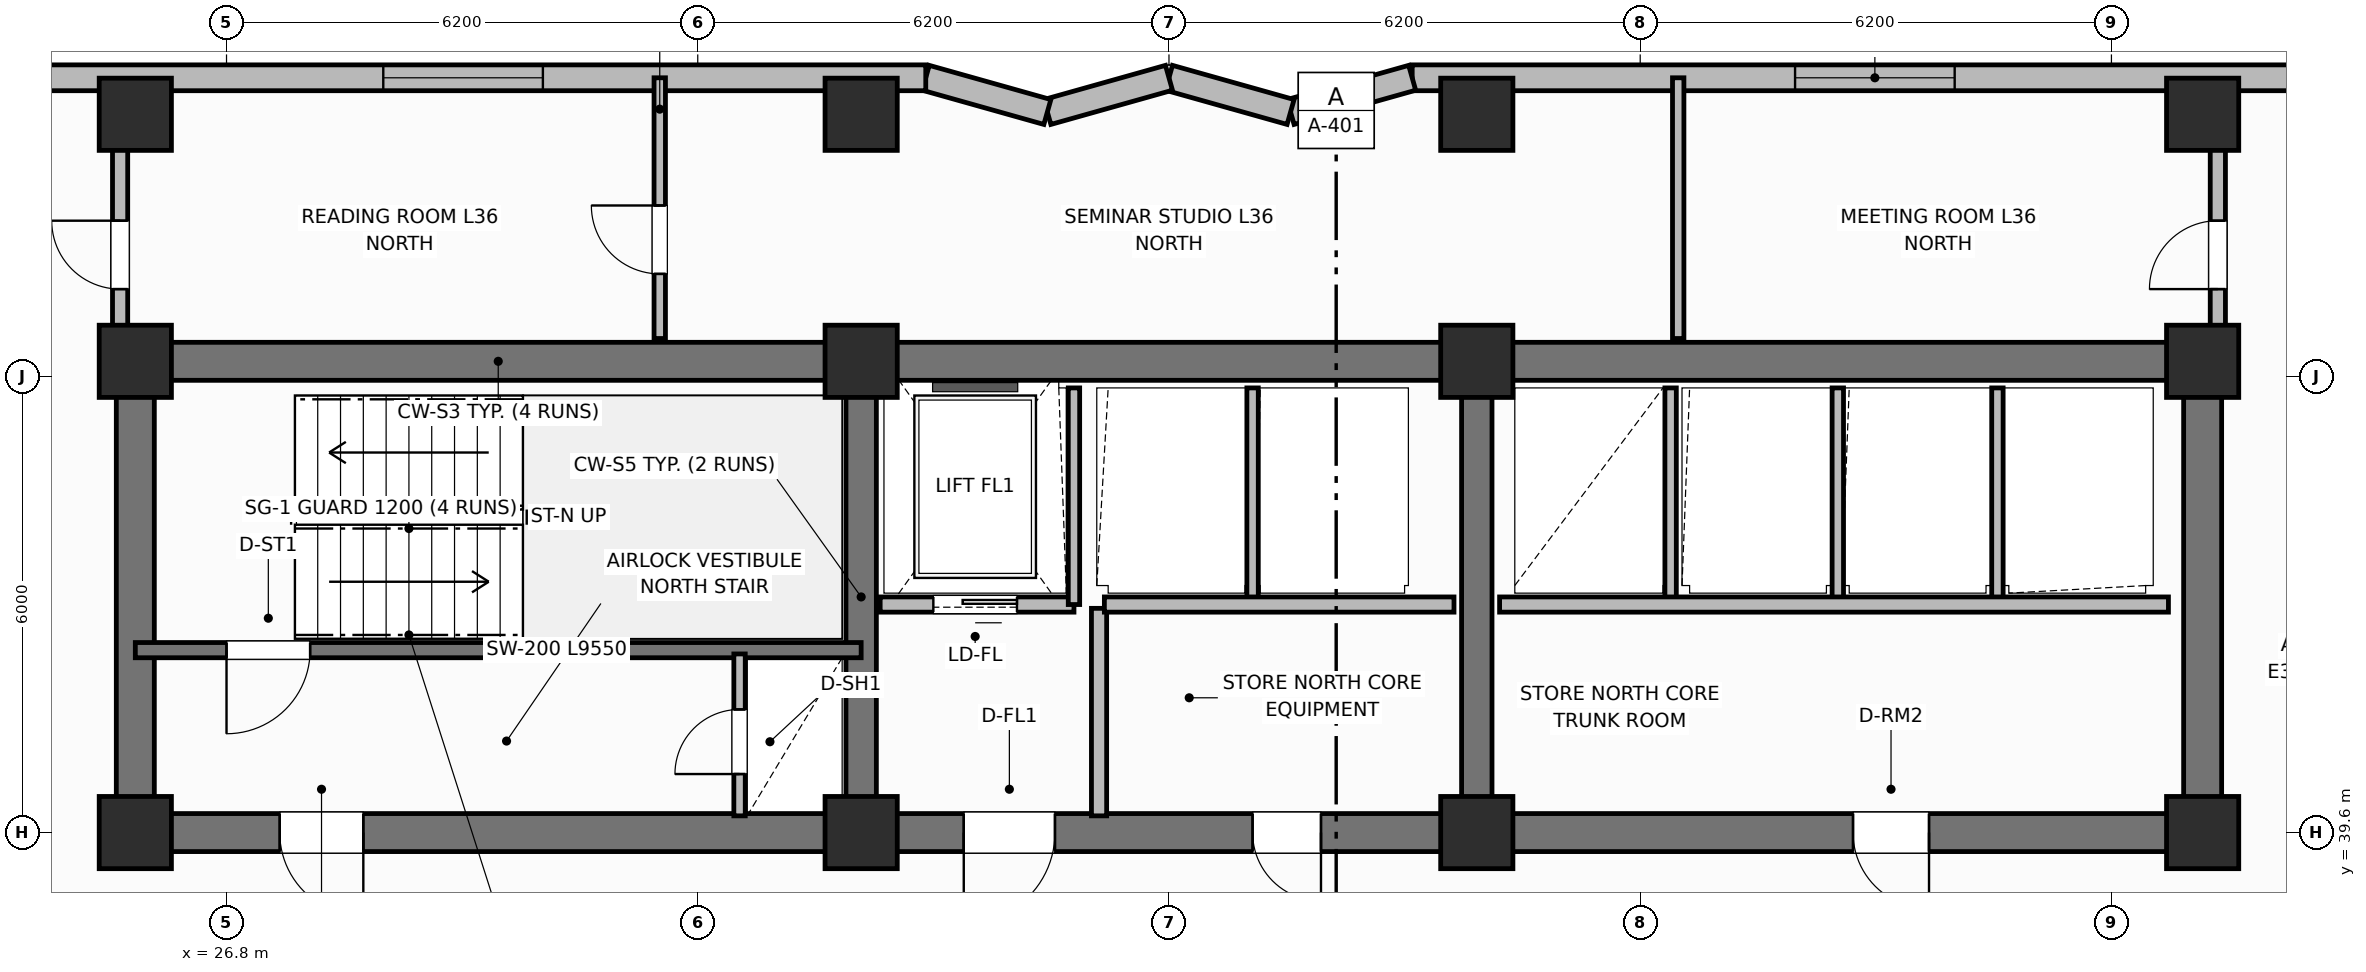
"""IFC4 building model, lengths in metres.
Left out: names, types, materials, properties, quantities, classifications, styles, units other than length and angle.
Written with IfcOpenShell. Run it as: python <this file> out.ifc"""

import sys

from ifc_helpers import new_model, si_unit, direction, frame, frame_2d, origin, origin_2d, place, context, subcontext, project, spatial, rectangle, extrude, element, fill, save


model = new_model("IFC4")
c1 = context("Model", 3, precision=1e-05, world=origin(), true_north=direction((0.0, 1.0)))
c2 = subcontext(c1, "Body", "Model", "MODEL_VIEW")
j1 = project(units=[si_unit("LENGTHUNIT", "METRE"), si_unit("PLANEANGLEUNIT", "RADIAN")], contexts=[c1])
p1 = place(None, origin())
s1 = spatial("IfcSite", under=j1, at=p1, CompositionType="ELEMENT")
p2 = place(p1, origin())
s2 = spatial("IfcBuilding", under=s1, at=p2, CompositionType="ELEMENT")
p3 = place(p2, frame((0.0, 0.0, 147.8)))
s3 = spatial("IfcBuildingStorey", under=s2, at=p3, CompositionType="ELEMENT", Elevation=147.8)
p4 = place(p3, frame((25.6, 45.8, 0.0), z_axis=(0.0, 0.0, 1.0), x_axis=(1.0, 0.0, 0.0)))
e1 = element("IfcWall", 1, at=p4, inside=s3, PredefinedType="SHEAR", context=c2, shape_type="SweptSolid", body=[
    extrude(rectangle(XDim=27.2, YDim=0.5, at=frame_2d((13.6, 0.0))), origin(), (0.0, 0.0, 1.0), 3.7),
])
for number, where, z_axis, x_axis in (
    (2, (25.6, 39.85, 0.0), (0.0, 0.0, 1.0), (0.0, 1.0, 0.0)),
    (3, (52.8, 39.85, 0.0), (0.0, 0.0, 1.0), (0.0, 1.0, 0.0)),
):
    element("IfcWall", number, at=place(p3, frame(where, z_axis=z_axis, x_axis=x_axis)), inside=s3, PredefinedType="SHEAR", context=c2, shape_type="SweptSolid", body=[
        extrude(rectangle(XDim=5.7, YDim=0.5, at=frame_2d((2.85, 0.0))), origin(), (0.0, 0.0, 1.0), 3.7),
    ])
p5 = place(p3, frame((52.8, 39.6, 0.0), z_axis=(0.0, 0.0, 1.0), x_axis=(-1.0, 0.0, 0.0)))
e4 = element("IfcWall", 4, at=p5, inside=s3, PredefinedType="SHEAR", context=c2, shape_type="SweptSolid", body=[
    extrude(rectangle(XDim=27.2, YDim=0.5, at=frame_2d((13.6, 0.0))), origin(), (0.0, 0.0, 1.0), 3.7),
])
p6 = place(p5, frame((24.2, 0.0, 0.0)))
e5 = element("IfcOpeningElement", 5, at=p6, cuts=e4, PredefinedType="OPENING", context=c2, shape_type="SweptSolid", body=[
    extrude(rectangle(XDim=1.1, YDim=2.15, at=frame_2d((0.55, 1.075))), frame((0.0, 0.26, 0.0), z_axis=(0.0, -1.0, 0.0), x_axis=(1.0, 0.0, 0.0)), (0.0, 0.0, 1.0), 0.52),
])
p7 = place(p5, frame((15.1, 0.0, 0.0)))
e6 = element("IfcOpeningElement", 6, at=p7, cuts=e4, PredefinedType="OPENING", context=c2, shape_type="SweptSolid", body=[
    extrude(rectangle(XDim=1.2, YDim=2.15, at=frame_2d((0.6, 1.075))), frame((0.0, 0.26, 0.0), z_axis=(0.0, -1.0, 0.0), x_axis=(1.0, 0.0, 0.0)), (0.0, 0.0, 1.0), 0.52),
])
p8 = place(p5, frame((11.6, 0.0, 0.0)))
e7 = element("IfcOpeningElement", 7, at=p8, cuts=e4, PredefinedType="OPENING", context=c2, shape_type="SweptSolid", body=[
    extrude(rectangle(XDim=0.9, YDim=2.1, at=frame_2d((0.45, 1.05))), frame((0.0, 0.26, 0.0), z_axis=(0.0, -1.0, 0.0), x_axis=(1.0, 0.0, 0.0)), (0.0, 0.0, 1.0), 0.52),
])
p9 = place(p5, frame((3.6, 0.0, 0.0)))
e8 = element("IfcOpeningElement", 8, at=p9, cuts=e4, PredefinedType="OPENING", context=c2, shape_type="SweptSolid", body=[
    extrude(rectangle(XDim=1.0, YDim=2.15, at=frame_2d((0.5, 1.075))), frame((0.0, 0.26, 0.0), z_axis=(0.0, -1.0, 0.0), x_axis=(1.0, 0.0, 0.0)), (0.0, 0.0, 1.0), 0.52),
])
for number, where, z_axis, x_axis in (
    (9, (35.15, 39.85, 0.0), (0.0, 0.0, 1.0), (0.0, 1.0, 0.0)),
    (10, (43.25, 39.85, 0.0), (0.0, 0.0, 1.0), (0.0, 1.0, 0.0)),
):
    element("IfcWall", number, at=place(p3, frame(where, z_axis=z_axis, x_axis=x_axis)), inside=s3, PredefinedType="SHEAR", context=c2, shape_type="SweptSolid", body=[
        extrude(rectangle(XDim=5.7, YDim=0.4, at=frame_2d((2.85, 0.0))), origin(), (0.0, 0.0, 1.0), 3.7),
    ])
for number, where, z_axis, x_axis in (
    (11, (25.6, 39.6, 0.0), (0.0, 0.0, 1.0), (1.0, 0.0, 0.0)),
    (12, (25.6, 45.8, 0.0), (0.0, 0.0, 1.0), (1.0, 0.0, 0.0)),
    (13, (35.15, 39.6, 0.0), (0.0, 0.0, 1.0), (1.0, 0.0, 0.0)),
    (14, (35.15, 45.8, 0.0), (0.0, 0.0, 1.0), (1.0, 0.0, 0.0)),
    (15, (43.25, 39.6, 0.0), (0.0, 0.0, 1.0), (1.0, 0.0, 0.0)),
    (16, (43.25, 45.8, 0.0), (0.0, 0.0, 1.0), (1.0, 0.0, 0.0)),
    (17, (52.8, 39.6, 0.0), (0.0, 0.0, 1.0), (1.0, 0.0, 0.0)),
    (18, (52.8, 45.8, 0.0), (0.0, 0.0, 1.0), (1.0, 0.0, 0.0)),
    (19, (25.6, 49.05, 0.0), (0.0, 0.0, 1.0), (1.0, 0.0, 0.0)),
    (20, (35.15, 49.05, 0.0), (0.0, 0.0, 1.0), (1.0, 0.0, 0.0)),
    (21, (43.25, 49.05, 0.0), (0.0, 0.0, 1.0), (1.0, 0.0, 0.0)),
    (22, (52.8, 49.05, 0.0), (0.0, 0.0, 1.0), (1.0, 0.0, 0.0)),
):
    element("IfcColumn", number, at=place(p3, frame(where, z_axis=z_axis, x_axis=x_axis)), inside=s3, PredefinedType="COLUMN", context=c2, shape_type="SweptSolid", body=[
        extrude(rectangle(XDim=0.95, YDim=0.95, at=origin_2d()), origin(), (0.0, 0.0, 1.0), 3.7),
    ])
p10 = place(p3, frame((58.2, 49.53, 0.0), z_axis=(0.0, 0.0, 1.0), x_axis=(-1.0, 0.0, 0.0)))
e23 = element("IfcWall", 23, at=p10, inside=s3, PredefinedType="SOLIDWALL", context=c2, shape_type="SweptSolid", body=[
    extrude(rectangle(XDim=15.8, YDim=0.34, at=frame_2d((7.9, 0.0))), origin(), (0.0, 0.0, 1.0), 2.72),
])
p11 = place(p10, frame((8.663, 0.0, 0.7)))
e24 = element("IfcOpeningElement", 24, at=p11, cuts=e23, PredefinedType="OPENING", context=c2, shape_type="SweptSolid", body=[
    extrude(rectangle(XDim=2.1, YDim=1.9, at=frame_2d((1.05, 0.95))), frame((0.0, 0.18, 0.0), z_axis=(0.0, -1.0, 0.0), x_axis=(1.0, 0.0, 0.0)), (0.0, 0.0, 1.0), 0.36),
])
p12 = place(p3, frame((42.4, 49.53, 0.0), z_axis=(0.0, 0.0, 1.0), x_axis=(-0.962652136636, -0.270741322725, 0.0)))
e25 = element("IfcWall", 25, at=p12, inside=s3, PredefinedType="SOLIDWALL", context=c2, shape_type="SweptSolid", body=[
    extrude(rectangle(XDim=1.662, YDim=0.34, at=frame_2d((0.831, 0.0))), origin(), (0.0, 0.0, 1.0), 2.72),
])
p13 = place(p3, frame((40.8, 49.08, 0.0), z_axis=(0.0, 0.0, 1.0), x_axis=(-0.962662902433, 0.270703040766, 0.0)))
e26 = element("IfcWall", 26, at=p13, inside=s3, PredefinedType="SOLIDWALL", context=c2, shape_type="SweptSolid", body=[
    extrude(rectangle(XDim=1.662, YDim=0.34, at=frame_2d((0.831, 0.0))), origin(), (0.0, 0.0, 1.0), 2.72),
])
p14 = place(p3, frame((39.2, 49.53, 0.0), z_axis=(0.0, 0.0, 1.0), x_axis=(-0.962652136636, -0.270741322725, 0.0)))
e27 = element("IfcWall", 27, at=p14, inside=s3, PredefinedType="SOLIDWALL", context=c2, shape_type="SweptSolid", body=[
    extrude(rectangle(XDim=1.662, YDim=0.34, at=frame_2d((0.831, 0.0))), origin(), (0.0, 0.0, 1.0), 2.72),
])
p15 = place(p3, frame((37.6, 49.08, 0.0), z_axis=(0.0, 0.0, 1.0), x_axis=(-0.962662902433, 0.270703040766, 0.0)))
e28 = element("IfcWall", 28, at=p15, inside=s3, PredefinedType="SOLIDWALL", context=c2, shape_type="SweptSolid", body=[
    extrude(rectangle(XDim=1.662, YDim=0.34, at=frame_2d((0.831, 0.0))), origin(), (0.0, 0.0, 1.0), 2.72),
])
p16 = place(p3, frame((36.0, 49.53, 0.0), z_axis=(0.0, 0.0, 1.0), x_axis=(-1.0, 0.0, 0.0)))
e29 = element("IfcWall", 29, at=p16, inside=s3, PredefinedType="SOLIDWALL", context=c2, shape_type="SweptSolid", body=[
    extrude(rectangle(XDim=15.8, YDim=0.34, at=frame_2d((7.9, 0.0))), origin(), (0.0, 0.0, 1.0), 2.72),
])
p17 = place(p16, frame((5.038, 0.0, 0.7)))
e30 = element("IfcOpeningElement", 30, at=p17, cuts=e29, PredefinedType="OPENING", context=c2, shape_type="SweptSolid", body=[
    extrude(rectangle(XDim=2.1, YDim=1.9, at=frame_2d((1.05, 0.95))), frame((0.0, 0.18, 0.0), z_axis=(0.0, -1.0, 0.0), x_axis=(1.0, 0.0, 0.0)), (0.0, 0.0, 1.0), 0.36),
])
p18 = place(p3, frame((35.15, 42.0, 0.0), z_axis=(0.0, 0.0, 1.0), x_axis=(-1.0, 0.0, 0.0)))
e31 = element("IfcWall", 31, at=p18, inside=s3, PredefinedType="SHEAR", context=c2, shape_type="SweptSolid", body=[
    extrude(rectangle(XDim=9.55, YDim=0.2, at=frame_2d((4.775, 0.0))), origin(), (0.0, 0.0, 1.0), 3.7),
])
p19 = place(p18, frame((7.25, 0.0, 0.0)))
e32 = element("IfcOpeningElement", 32, at=p19, cuts=e31, PredefinedType="OPENING", context=c2, shape_type="SweptSolid", body=[
    extrude(rectangle(XDim=1.1, YDim=2.15, at=frame_2d((0.55, 1.075))), frame((0.0, 0.11, 0.0), z_axis=(0.0, -1.0, 0.0), x_axis=(1.0, 0.0, 0.0)), (0.0, 0.0, 1.0), 0.22),
])
p20 = place(p3, frame((33.55, 39.82, 0.0), z_axis=(0.0, 0.0, 1.0), x_axis=(0.0, 1.0, 0.0)))
e33 = element("IfcWall", 33, at=p20, inside=s3, PredefinedType="PARTITIONING", context=c2, shape_type="SweptSolid", body=[
    extrude(rectangle(XDim=2.13, YDim=0.15, at=frame_2d((1.065, 0.0))), origin(), (0.0, 0.0, 1.0), 2.55),
])
p21 = place(p20, frame((0.55, 0.0, 0.0)))
e34 = element("IfcOpeningElement", 34, at=p21, cuts=e33, PredefinedType="OPENING", context=c2, shape_type="SweptSolid", body=[
    extrude(rectangle(XDim=0.85, YDim=2.05, at=frame_2d((0.425, 1.025))), frame((0.0, 0.085, 0.0), z_axis=(0.0, -1.0, 0.0), x_axis=(1.0, 0.0, 0.0)), (0.0, 0.0, 1.0), 0.17),
])
p22 = place(p3, frame((37.95, 42.6, 0.0), z_axis=(0.0, 0.0, 1.0), x_axis=(-1.0, 0.0, 0.0)))
e35 = element("IfcWall", 35, at=p22, inside=s3, PredefinedType="PARTITIONING", context=c2, shape_type="SweptSolid", body=[
    extrude(rectangle(XDim=2.55, YDim=0.2, at=frame_2d((1.275, 0.0))), origin(), (0.0, 0.0, 1.0), 2.32),
])
p23 = place(p22, frame((0.75, 0.0, 0.0)))
e36 = element("IfcOpeningElement", 36, at=p23, cuts=e35, PredefinedType="OPENING", context=c2, shape_type="SweptSolid", body=[
    extrude(rectangle(XDim=1.1, YDim=2.15, at=frame_2d((0.55, 1.075))), frame((0.0, 0.11, 0.0), z_axis=(0.0, -1.0, 0.0), x_axis=(1.0, 0.0, 0.0)), (0.0, 0.0, 1.0), 0.22),
])
p24 = place(p3, frame((37.95, 42.6, 0.0), z_axis=(0.0, 0.0, 1.0), x_axis=(0.0, 1.0, 0.0)))
e37 = element("IfcWall", 37, at=p24, inside=s3, PredefinedType="PARTITIONING", context=c2, shape_type="SweptSolid", body=[
    extrude(rectangle(XDim=2.85, YDim=0.15, at=frame_2d((1.425, 0.0))), origin(), (0.0, 0.0, 1.0), 2.55),
])
p25 = place(p3, frame((38.28, 39.82, 0.0), z_axis=(0.0, 0.0, 1.0), x_axis=(0.0, 1.0, 0.0)))
e38 = element("IfcWall", 38, at=p25, inside=s3, PredefinedType="PARTITIONING", context=c2, shape_type="SweptSolid", body=[
    extrude(rectangle(XDim=2.73, YDim=0.2, at=frame_2d((1.365, 0.0))), origin(), (0.0, 0.0, 1.0), 2.55),
])
p26 = place(p3, frame((40.3, 42.65, 0.0), z_axis=(0.0, 0.0, 1.0), x_axis=(0.0, 1.0, 0.0)))
e39 = element("IfcWall", 39, at=p26, inside=s3, PredefinedType="PARTITIONING", context=c2, shape_type="SweptSolid", body=[
    extrude(rectangle(XDim=2.8, YDim=0.15, at=frame_2d((1.4, 0.0))), origin(), (0.0, 0.0, 1.0), 2.55),
])
p27 = place(p3, frame((42.95, 42.6, 0.0), z_axis=(0.0, 0.0, 1.0), x_axis=(-1.0, 0.0, 0.0)))
e40 = element("IfcWall", 40, at=p27, inside=s3, PredefinedType="PARTITIONING", context=c2, shape_type="SweptSolid", body=[
    extrude(rectangle(XDim=4.6, YDim=0.2, at=frame_2d((2.3, 0.0))), origin(), (0.0, 0.0, 1.0), 2.32),
])
for number, where, z_axis, x_axis in (
    (41, (45.8, 42.65, 0.0), (0.0, 0.0, 1.0), (0.0, 1.0, 0.0)),
    (42, (48.0, 42.65, 0.0), (0.0, 0.0, 1.0), (0.0, 1.0, 0.0)),
    (43, (50.1, 42.65, 0.0), (0.0, 0.0, 1.0), (0.0, 1.0, 0.0)),
):
    element("IfcWall", number, at=place(p3, frame(where, z_axis=z_axis, x_axis=x_axis)), inside=s3, PredefinedType="PARTITIONING", context=c2, shape_type="SweptSolid", body=[
        extrude(rectangle(XDim=2.8, YDim=0.15, at=frame_2d((1.4, 0.0))), origin(), (0.0, 0.0, 1.0), 2.55),
    ])
p28 = place(p3, frame((52.35, 42.6, 0.0), z_axis=(0.0, 0.0, 1.0), x_axis=(-1.0, 0.0, 0.0)))
e44 = element("IfcWall", 44, at=p28, inside=s3, PredefinedType="PARTITIONING", context=c2, shape_type="SweptSolid", body=[
    extrude(rectangle(XDim=8.8, YDim=0.2, at=frame_2d((4.4, 0.0))), origin(), (0.0, 0.0, 1.0), 2.55),
])
p29 = place(p3, frame((32.5, 46.1, 0.0), z_axis=(0.0, 0.0, 1.0), x_axis=(0.0, 1.0, 0.0)))
e45 = element("IfcWall", 45, at=p29, inside=s3, PredefinedType="PARTITIONING", context=c2, shape_type="SweptSolid", body=[
    extrude(rectangle(XDim=3.43, YDim=0.15, at=frame_2d((1.715, 0.0))), origin(), (0.0, 0.0, 1.0), 2.55),
])
p30 = place(p29, frame((0.85, 0.0, 0.0)))
e46 = element("IfcOpeningElement", 46, at=p30, cuts=e45, PredefinedType="OPENING", context=c2, shape_type="SweptSolid", body=[
    extrude(rectangle(XDim=0.9, YDim=2.1, at=frame_2d((0.45, 1.05))), frame((0.0, 0.085, 0.0), z_axis=(0.0, -1.0, 0.0), x_axis=(1.0, 0.0, 0.0)), (0.0, 0.0, 1.0), 0.17),
])
p31 = place(p3, frame((45.9, 46.1, 0.0), z_axis=(0.0, 0.0, 1.0), x_axis=(0.0, 1.0, 0.0)))
e47 = element("IfcWall", 47, at=p31, inside=s3, PredefinedType="PARTITIONING", context=c2, shape_type="SweptSolid", body=[
    extrude(rectangle(XDim=3.43, YDim=0.15, at=frame_2d((1.715, 0.0))), origin(), (0.0, 0.0, 1.0), 2.55),
])
p32 = place(p3, frame((25.4, 46.1, 0.0), z_axis=(0.0, 0.0, 1.0), x_axis=(0.0, 1.0, 0.0)))
e48 = element("IfcWall", 48, at=p32, inside=s3, PredefinedType="PARTITIONING", context=c2, shape_type="SweptSolid", body=[
    extrude(rectangle(XDim=2.83, YDim=0.2, at=frame_2d((1.415, 0.0))), origin(), (0.0, 0.0, 1.0), 2.55),
])
p33 = place(p32, frame((0.65, 0.0, 0.0)))
e49 = element("IfcOpeningElement", 49, at=p33, cuts=e48, PredefinedType="OPENING", context=c2, shape_type="SweptSolid", body=[
    extrude(rectangle(XDim=0.9, YDim=2.1, at=frame_2d((0.45, 1.05))), frame((0.0, 0.11, 0.0), z_axis=(0.0, -1.0, 0.0), x_axis=(1.0, 0.0, 0.0)), (0.0, 0.0, 1.0), 0.22),
])
p34 = place(p3, frame((53.0, 46.1, 0.0), z_axis=(0.0, 0.0, 1.0), x_axis=(0.0, 1.0, 0.0)))
e50 = element("IfcWall", 50, at=p34, inside=s3, PredefinedType="PARTITIONING", context=c2, shape_type="SweptSolid", body=[
    extrude(rectangle(XDim=2.83, YDim=0.2, at=frame_2d((1.415, 0.0))), origin(), (0.0, 0.0, 1.0), 2.55),
])
p35 = place(p34, frame((0.65, 0.0, 0.0)))
e51 = element("IfcOpeningElement", 51, at=p35, cuts=e50, PredefinedType="OPENING", context=c2, shape_type="SweptSolid", body=[
    extrude(rectangle(XDim=0.9, YDim=2.1, at=frame_2d((0.45, 1.05))), frame((0.0, 0.11, 0.0), z_axis=(0.0, -1.0, 0.0), x_axis=(1.0, 0.0, 0.0)), (0.0, 0.0, 1.0), 0.22),
])
p36 = place(p11, origin())
e52 = element("IfcWindow", 52, at=p36, inside=s3, PartitioningType="SINGLE_PANEL", PredefinedType="WINDOW", context=c2, shape_type="SweptSolid", body=[
    extrude(rectangle(XDim=2.1, YDim=1.9, at=frame_2d((1.05, 0.95))), frame((0.0, 0.03, 0.0), z_axis=(0.0, -1.0, 0.0), x_axis=(1.0, 0.0, 0.0)), (0.0, 0.0, 1.0), 0.06),
])
fill(e24, e52)
p37 = place(p17, origin())
e53 = element("IfcWindow", 53, at=p37, inside=s3, PartitioningType="SINGLE_PANEL", PredefinedType="WINDOW", context=c2, shape_type="SweptSolid", body=[
    extrude(rectangle(XDim=2.1, YDim=1.9, at=frame_2d((1.05, 0.95))), frame((0.0, 0.03, 0.0), z_axis=(0.0, -1.0, 0.0), x_axis=(1.0, 0.0, 0.0)), (0.0, 0.0, 1.0), 0.06),
])
fill(e30, e53)
p38 = place(p19, origin())
e54 = element("IfcDoor", 54, at=p38, inside=s3, OperationType="SINGLE_SWING_RIGHT", PredefinedType="DOOR", context=c2, shape_type="SweptSolid", body=[
    extrude(rectangle(XDim=1.1, YDim=2.15, at=frame_2d((0.55, 1.075))), frame((0.0, 0.025, 0.0), z_axis=(0.0, -1.0, 0.0), x_axis=(1.0, 0.0, 0.0)), (0.0, 0.0, 1.0), 0.05),
])
fill(e32, e54)
p39 = place(p21, origin())
e55 = element("IfcDoor", 55, at=p39, inside=s3, OperationType="SINGLE_SWING_LEFT", PredefinedType="TRAPDOOR", context=c2, shape_type="SweptSolid", body=[
    extrude(rectangle(XDim=0.85, YDim=2.05, at=frame_2d((0.425, 1.025))), frame((0.0, 0.025, 0.0), z_axis=(0.0, -1.0, 0.0), x_axis=(1.0, 0.0, 0.0)), (0.0, 0.0, 1.0), 0.05),
])
fill(e34, e55)
p40 = place(p23, origin())
e56 = element("IfcDoor", 56, at=p40, inside=s3, OperationType="SLIDING_TO_LEFT", PredefinedType="DOOR", context=c2, shape_type="SweptSolid", body=[
    extrude(rectangle(XDim=1.1, YDim=2.15, at=frame_2d((0.55, 1.075))), frame((0.0, 0.025, 0.0), z_axis=(0.0, -1.0, 0.0), x_axis=(1.0, 0.0, 0.0)), (0.0, 0.0, 1.0), 0.05),
])
fill(e36, e56)
p41 = place(p30, origin())
e57 = element("IfcDoor", 57, at=p41, inside=s3, OperationType="SINGLE_SWING_RIGHT", PredefinedType="DOOR", context=c2, shape_type="SweptSolid", body=[
    extrude(rectangle(XDim=0.9, YDim=2.1, at=frame_2d((0.45, 1.05))), frame((0.0, 0.025, 0.0), z_axis=(0.0, -1.0, 0.0), x_axis=(1.0, 0.0, 0.0)), (0.0, 0.0, 1.0), 0.05),
])
fill(e46, e57)
p42 = place(p33, origin())
e58 = element("IfcDoor", 58, at=p42, inside=s3, OperationType="SINGLE_SWING_RIGHT", PredefinedType="DOOR", context=c2, shape_type="SweptSolid", body=[
    extrude(rectangle(XDim=0.9, YDim=2.1, at=frame_2d((0.45, 1.05))), frame((0.0, 0.025, 0.0), z_axis=(0.0, -1.0, 0.0), x_axis=(1.0, 0.0, 0.0)), (0.0, 0.0, 1.0), 0.05),
])
fill(e49, e58)
p43 = place(p35, origin())
e59 = element("IfcDoor", 59, at=p43, inside=s3, OperationType="SINGLE_SWING_LEFT", PredefinedType="DOOR", context=c2, shape_type="SweptSolid", body=[
    extrude(rectangle(XDim=0.9, YDim=2.1, at=frame_2d((0.45, 1.05))), frame((0.0, 0.025, 0.0), z_axis=(0.0, -1.0, 0.0), x_axis=(1.0, 0.0, 0.0)), (0.0, 0.0, 1.0), 0.05),
])
fill(e51, e59)
p44 = place(p6, origin())
e60 = element("IfcDoor", 60, at=p44, inside=s3, OperationType="SINGLE_SWING_LEFT", PredefinedType="DOOR", context=c2, shape_type="SweptSolid", body=[
    extrude(rectangle(XDim=1.1, YDim=2.15, at=frame_2d((0.55, 1.075))), frame((0.0, 0.025, 0.0), z_axis=(0.0, -1.0, 0.0), x_axis=(1.0, 0.0, 0.0)), (0.0, 0.0, 1.0), 0.05),
])
fill(e5, e60)
p45 = place(p7, origin())
e61 = element("IfcDoor", 61, at=p45, inside=s3, OperationType="SINGLE_SWING_RIGHT", PredefinedType="DOOR", context=c2, shape_type="SweptSolid", body=[
    extrude(rectangle(XDim=1.2, YDim=2.15, at=frame_2d((0.6, 1.075))), frame((0.0, 0.025, 0.0), z_axis=(0.0, -1.0, 0.0), x_axis=(1.0, 0.0, 0.0)), (0.0, 0.0, 1.0), 0.05),
])
fill(e6, e61)
p46 = place(p8, origin())
e62 = element("IfcDoor", 62, at=p46, inside=s3, OperationType="SINGLE_SWING_LEFT", PredefinedType="DOOR", context=c2, shape_type="SweptSolid", body=[
    extrude(rectangle(XDim=0.9, YDim=2.1, at=frame_2d((0.45, 1.05))), frame((0.0, 0.025, 0.0), z_axis=(0.0, -1.0, 0.0), x_axis=(1.0, 0.0, 0.0)), (0.0, 0.0, 1.0), 0.05),
])
fill(e7, e62)
p47 = place(p9, origin())
e63 = element("IfcDoor", 63, at=p47, inside=s3, OperationType="SINGLE_SWING_LEFT", PredefinedType="DOOR", context=c2, shape_type="SweptSolid", body=[
    extrude(rectangle(XDim=1.0, YDim=2.15, at=frame_2d((0.5, 1.075))), frame((0.0, 0.025, 0.0), z_axis=(0.0, -1.0, 0.0), x_axis=(1.0, 0.0, 0.0)), (0.0, 0.0, 1.0), 0.05),
])
fill(e8, e63)
save(model, sys.argv[1])
